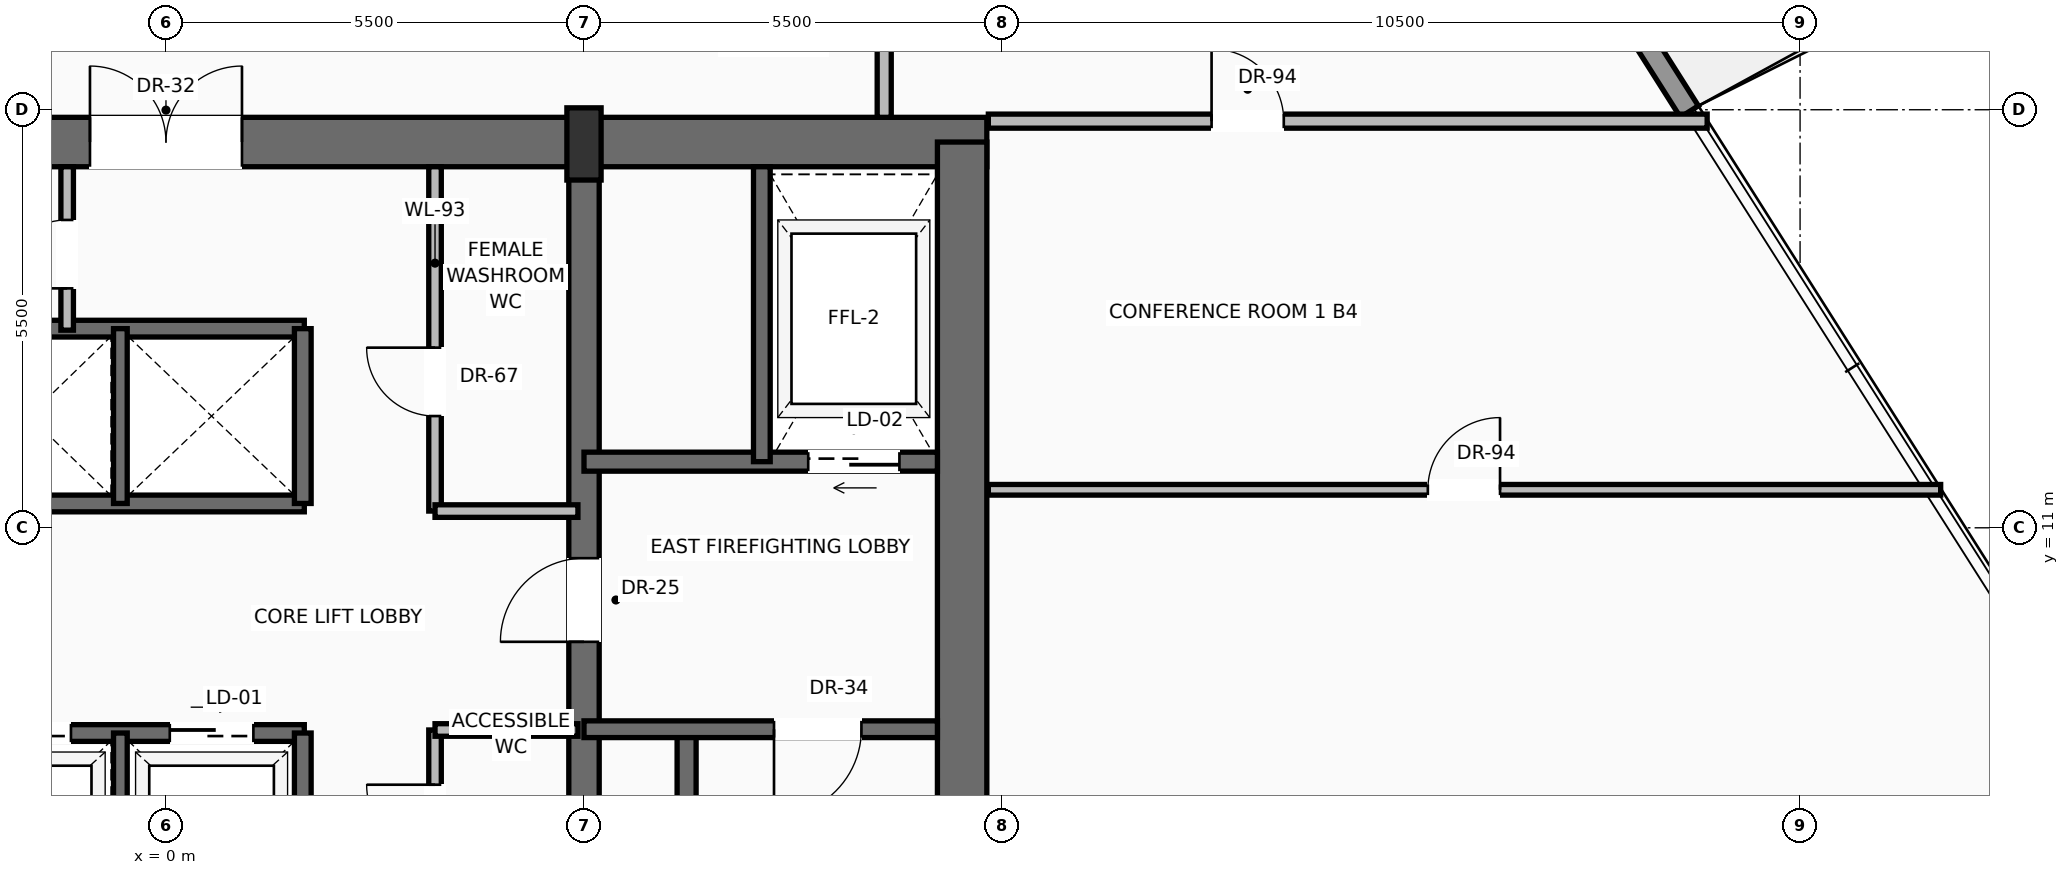
"""IFC4 building model, lengths in metres.
Left out: names, types, materials, properties, quantities, classifications, styles, units other than length and angle.
Written with IfcOpenShell. Run it as: python <this file> out.ifc"""

import sys

from ifc_helpers import new_model, si_unit, direction, frame, frame_2d, origin, origin_2d, place, context, subcontext, project, spatial, rectangle, extrude, source, transform, mapped, element, fill, save


model = new_model("IFC4")
c1 = context("Model", 3, precision=1e-05, world=origin(), true_north=direction((0.0, 1.0)))
c2 = subcontext(c1, "Body", "Model", "MODEL_VIEW")
j1 = project(units=[si_unit("LENGTHUNIT", "METRE"), si_unit("PLANEANGLEUNIT", "RADIAN")], contexts=[c1])
p1 = place(None, origin())
s1 = spatial("IfcSite", under=j1, at=p1, CompositionType="ELEMENT")
p2 = place(p1, origin())
s2 = spatial("IfcBuilding", under=s1, at=p2, CompositionType="ELEMENT")
p3 = place(p2, frame((0.0, 0.0, 185.8)))
s3 = spatial("IfcBuildingStorey", under=s2, at=p3, CompositionType="ELEMENT", Elevation=185.8)
p4 = place(p3, frame((-10.8, 16.075, 0.0), z_axis=(0.0, 0.0, 1.0), x_axis=(1.0, 0.0, 0.0)))
e1 = element("IfcWall", 1, at=p4, inside=s3, PredefinedType="SHEAR", context=c2, shape_type="SweptSolid", body=[
    extrude(rectangle(XDim=21.6, YDim=0.65, at=frame_2d((10.8, 0.0))), origin(), (0.0, 0.0, 1.0), 3.47),
])
p5 = place(p4, frame((3.37, 0.0, 0.0)))
e2 = element("IfcOpeningElement", 2, at=p5, cuts=e1, PredefinedType="OPENING", context=c2, shape_type="SweptSolid", body=[
    extrude(rectangle(XDim=1.3, YDim=2.3, at=frame_2d((0.65, 1.15))), frame((0.0, 0.335, 0.0), z_axis=(0.0, -1.0, 0.0), x_axis=(1.0, 0.0, 0.0)), (0.0, 0.0, 1.0), 0.67),
])
p6 = place(p4, frame((9.8, 0.0, 0.0)))
e3 = element("IfcOpeningElement", 3, at=p6, cuts=e1, PredefinedType="OPENING", context=c2, shape_type="SweptSolid", body=[
    extrude(rectangle(XDim=2.0, YDim=2.4, at=frame_2d((1.0, 1.2))), frame((0.0, 0.335, 0.0), z_axis=(0.0, -1.0, 0.0), x_axis=(1.0, 0.0, 0.0)), (0.0, 0.0, 1.0), 0.67),
])
p7 = place(p3, frame((10.475, 0.525, 0.0), z_axis=(0.0, 0.0, 1.0), x_axis=(0.0, 1.0, 0.0)))
e4 = element("IfcWall", 4, at=p7, inside=s3, PredefinedType="SHEAR", context=c2, shape_type="SweptSolid", body=[
    extrude(rectangle(XDim=15.55, YDim=0.65, at=frame_2d((7.775, 0.0))), origin(), (0.0, 0.0, 1.0), 3.47),
])
p8 = place(p3, frame((5.5, 0.525, 0.0), z_axis=(0.0, 0.0, 1.0), x_axis=(0.0, 1.0, 0.0)))
e5 = element("IfcWall", 5, at=p8, inside=s3, PredefinedType="SHEAR", context=c2, shape_type="SweptSolid", body=[
    extrude(rectangle(XDim=15.55, YDim=0.4, at=frame_2d((7.775, 0.0))), origin(), (0.0, 0.0, 1.0), 3.47),
])
p9 = place(p8, frame((8.975, 0.0, 0.0)))
e6 = element("IfcOpeningElement", 6, at=p9, cuts=e5, PredefinedType="OPENING", context=c2, shape_type="SweptSolid", body=[
    extrude(rectangle(XDim=1.1, YDim=2.2, at=frame_2d((0.55, 1.1))), frame((0.0, 0.21, 0.0), z_axis=(0.0, -1.0, 0.0), x_axis=(1.0, 0.0, 0.0)), (0.0, 0.0, 1.0), 0.42),
])
m1 = source(origin(), c2, "Body", "SweptSolid", [
    extrude(rectangle(XDim=0.45, YDim=0.95, at=origin_2d()), origin(), (0.0, 0.0, 1.0), 3.7),
])
p10 = place(p3, frame((5.5, 16.05, 0.0), z_axis=(0.0, 0.0, 1.0), x_axis=(1.0, 0.0, 0.0)))
e7 = element("IfcColumn", 7, at=p10, inside=s3, PredefinedType="PILASTER", context=c2, shape_type="MappedRepresentation", body=[
    mapped(m1, transform((0.0, 0.0, 0.0), scale=1.0)),
])
p11 = place(p3, frame((9.943, 32.422, 0.0), z_axis=(0.0, 0.0, 1.0), x_axis=(0.535123469973, -0.844773858428, 0.0)))
e8 = element("IfcWall", 8, at=p11, inside=s3, PredefinedType="SOLIDWALL", context=c2, shape_type="SweptSolid", body=[
    extrude(rectangle(XDim=18.875, YDim=0.28, at=frame_2d((9.438, 0.0))), origin(), (0.0, 0.0, 1.0), 3.05),
])
p12 = place(p11, frame((4.53, 0.0, 0.0)))
e9 = element("IfcOpeningElement", 9, at=p12, cuts=e8, PredefinedType="OPENING", context=c2, shape_type="SweptSolid", body=[
    extrude(rectangle(XDim=1.6, YDim=2.35, at=frame_2d((0.8, 1.175))), frame((0.0, 0.15, 0.0), z_axis=(0.0, -1.0, 0.0), x_axis=(1.0, 0.0, 0.0)), (0.0, 0.0, 1.0), 0.3),
])
p13 = place(p11, frame((12.835, 0.0, 0.9)))
e10 = element("IfcOpeningElement", 10, at=p13, cuts=e8, PredefinedType="OPENING", context=c2, shape_type="SweptSolid", body=[
    extrude(rectangle(XDim=1.55, YDim=1.85, at=frame_2d((0.775, 0.925))), frame((0.0, 0.15, 0.0), z_axis=(0.0, -1.0, 0.0), x_axis=(1.0, 0.0, 0.0)), (0.0, 0.0, 1.0), 0.3),
])
p14 = place(p3, frame((6.85, 0.85, 0.0), z_axis=(0.0, 0.0, 1.0), x_axis=(0.0, 1.0, 0.0)))
e11 = element("IfcWall", 11, at=p14, inside=s3, PredefinedType="SOLIDWALL", context=c2, shape_type="SweptSolid", body=[
    extrude(rectangle(XDim=7.5, YDim=0.25, at=frame_2d((3.75, 0.0))), origin(), (0.0, 0.0, 1.0), 3.47),
])
p15 = place(p3, frame((10.15, 8.35, 0.0), z_axis=(0.0, 0.0, 1.0), x_axis=(-1.0, 0.0, 0.0)))
e12 = element("IfcWall", 12, at=p15, inside=s3, PredefinedType="SOLIDWALL", context=c2, shape_type="SweptSolid", body=[
    extrude(rectangle(XDim=4.65, YDim=0.22, at=frame_2d((2.325, 0.0))), origin(), (0.0, 0.0, 1.0), 3.47),
])
p16 = place(p15, frame((1.0, 0.0, 0.0)))
e13 = element("IfcOpeningElement", 13, at=p16, cuts=e12, PredefinedType="OPENING", context=c2, shape_type="SweptSolid", body=[
    extrude(rectangle(XDim=1.15, YDim=2.2, at=frame_2d((0.575, 1.1))), frame((0.0, 0.12, 0.0), z_axis=(0.0, -1.0, 0.0), x_axis=(1.0, 0.0, 0.0)), (0.0, 0.0, 1.0), 0.24),
])
p17 = place(p3, frame((10.15, 11.87, 0.0), z_axis=(0.0, 0.0, 1.0), x_axis=(-1.0, 0.0, 0.0)))
e14 = element("IfcWall", 14, at=p17, inside=s3, PredefinedType="SOLIDWALL", context=c2, shape_type="SweptSolid", body=[
    extrude(rectangle(XDim=4.65, YDim=0.25, at=frame_2d((2.325, 0.0))), origin(), (0.0, 0.0, 1.0), 3.47),
])
p18 = place(p17, frame((0.5, 0.0, 0.0)))
e15 = element("IfcOpeningElement", 15, at=p18, cuts=e14, PredefinedType="OPENING", context=c2, shape_type="SweptSolid", body=[
    extrude(rectangle(XDim=1.2, YDim=2.25, at=frame_2d((0.6, 1.125))), frame((0.0, 0.135, 0.0), z_axis=(0.0, -1.0, 0.0), x_axis=(1.0, 0.0, 0.0)), (0.0, 0.0, 1.0), 0.27),
])
p19 = place(p3, frame((7.84, 11.87, 0.0), z_axis=(0.0, 0.0, 1.0), x_axis=(0.0, 1.0, 0.0)))
e16 = element("IfcWall", 16, at=p19, inside=s3, PredefinedType="SOLIDWALL", context=c2, shape_type="SweptSolid", body=[
    extrude(rectangle(XDim=3.88, YDim=0.22, at=frame_2d((1.94, 0.0))), origin(), (0.0, 0.0, 1.0), 3.47),
])
p20 = place(p3, frame((3.54, 6.0, 0.0), z_axis=(0.0, 0.0, 1.0), x_axis=(0.0, 1.0, 0.0)))
e17 = element("IfcWall", 17, at=p20, inside=s3, PredefinedType="PARTITIONING", context=c2, shape_type="SweptSolid", body=[
    extrude(rectangle(XDim=2.34, YDim=0.165, at=frame_2d((1.17, 0.0))), origin(), (0.0, 0.0, 1.0), 3.462),
])
p21 = place(p20, frame((0.72, 0.0, 0.0)))
e18 = element("IfcOpeningElement", 18, at=p21, cuts=e17, PredefinedType="OPENING", context=c2, shape_type="SweptSolid", body=[
    extrude(rectangle(XDim=0.9, YDim=2.1, at=frame_2d((0.45, 1.05))), frame((0.0, 0.093, 0.0), z_axis=(0.0, -1.0, 0.0), x_axis=(1.0, 0.0, 0.0)), (0.0, 0.0, 1.0), 0.185),
])
p22 = place(p3, frame((3.54, 8.34, 0.0), z_axis=(0.0, 0.0, 1.0), x_axis=(1.0, 0.0, 0.0)))
e19 = element("IfcWall", 19, at=p22, inside=s3, PredefinedType="PARTITIONING", context=c2, shape_type="SweptSolid", body=[
    extrude(rectangle(XDim=1.88, YDim=0.165, at=frame_2d((0.94, 0.0))), origin(), (0.0, 0.0, 1.0), 3.462),
])
p23 = place(p3, frame((-5.5, 8.3, 0.0), z_axis=(0.0, 0.0, 1.0), x_axis=(1.0, 0.0, 0.0)))
e20 = element("IfcWall", 20, at=p23, inside=s3, PredefinedType="SOLIDWALL", context=c2, shape_type="SweptSolid", body=[
    extrude(rectangle(XDim=7.32, YDim=0.22, at=frame_2d((3.66, 0.0))), origin(), (0.0, 0.0, 1.0), 3.47),
])
p24 = place(p23, frame((0.75, 0.0, 0.0)))
e21 = element("IfcOpeningElement", 21, at=p24, cuts=e20, PredefinedType="OPENING", context=c2, shape_type="SweptSolid", body=[
    extrude(rectangle(XDim=1.1, YDim=2.2, at=frame_2d((0.55, 1.1))), frame((0.0, 0.12, 0.0), z_axis=(0.0, -1.0, 0.0), x_axis=(1.0, 0.0, 0.0)), (0.0, 0.0, 1.0), 0.24),
])
p25 = place(p23, frame((3.15, 0.0, 0.0)))
e22 = element("IfcOpeningElement", 22, at=p25, cuts=e20, PredefinedType="OPENING", context=c2, shape_type="SweptSolid", body=[
    extrude(rectangle(XDim=1.1, YDim=2.2, at=frame_2d((0.55, 1.1))), frame((0.0, 0.12, 0.0), z_axis=(0.0, -1.0, 0.0), x_axis=(1.0, 0.0, 0.0)), (0.0, 0.0, 1.0), 0.24),
])
p26 = place(p23, frame((5.55, 0.0, 0.0)))
e23 = element("IfcOpeningElement", 23, at=p26, cuts=e20, PredefinedType="OPENING", context=c2, shape_type="SweptSolid", body=[
    extrude(rectangle(XDim=1.1, YDim=2.2, at=frame_2d((0.55, 1.1))), frame((0.0, 0.12, 0.0), z_axis=(0.0, -1.0, 0.0), x_axis=(1.0, 0.0, 0.0)), (0.0, 0.0, 1.0), 0.24),
])
p27 = place(p3, frame((1.8, 6.0, 0.0), z_axis=(0.0, 0.0, 1.0), x_axis=(0.0, 1.0, 0.0)))
e24 = element("IfcWall", 24, at=p27, inside=s3, PredefinedType="SOLIDWALL", context=c2, shape_type="SweptSolid", body=[
    extrude(rectangle(XDim=2.3, YDim=0.22, at=frame_2d((1.15, 0.0))), origin(), (0.0, 0.0, 1.0), 3.47),
])
p28 = place(p3, frame((-0.6, 6.0, 0.0), z_axis=(0.0, 0.0, 1.0), x_axis=(0.0, 1.0, 0.0)))
e25 = element("IfcWall", 25, at=p28, inside=s3, PredefinedType="SOLIDWALL", context=c2, shape_type="SweptSolid", body=[
    extrude(rectangle(XDim=2.3, YDim=0.18, at=frame_2d((1.15, 0.0))), origin(), (0.0, 0.0, 1.0), 3.47),
])
for number, where, z_axis, x_axis in (
    (26, (-5.5, 11.32, 0.0), (0.0, 0.0, 1.0), (1.0, 0.0, 0.0)),
    (27, (-5.5, 13.62, 0.0), (0.0, 0.0, 1.0), (1.0, 0.0, 0.0)),
):
    element("IfcWall", number, at=place(p3, frame(where, z_axis=z_axis, x_axis=x_axis)), inside=s3, PredefinedType="SOLIDWALL", context=c2, shape_type="SweptSolid", body=[
        extrude(rectangle(XDim=7.32, YDim=0.22, at=frame_2d((3.66, 0.0))), origin(), (0.0, 0.0, 1.0), 3.47),
    ])
p29 = place(p3, frame((1.8, 11.32, 0.0), z_axis=(0.0, 0.0, 1.0), x_axis=(0.0, 1.0, 0.0)))
e28 = element("IfcWall", 28, at=p29, inside=s3, PredefinedType="SOLIDWALL", context=c2, shape_type="SweptSolid", body=[
    extrude(rectangle(XDim=2.3, YDim=0.22, at=frame_2d((1.15, 0.0))), origin(), (0.0, 0.0, 1.0), 3.47),
])
p30 = place(p3, frame((-0.6, 11.32, 0.0), z_axis=(0.0, 0.0, 1.0), x_axis=(0.0, 1.0, 0.0)))
e29 = element("IfcWall", 29, at=p30, inside=s3, PredefinedType="SOLIDWALL", context=c2, shape_type="SweptSolid", body=[
    extrude(rectangle(XDim=2.3, YDim=0.18, at=frame_2d((1.15, 0.0))), origin(), (0.0, 0.0, 1.0), 3.47),
])
p31 = place(p3, frame((-1.3, 13.6, 0.0), z_axis=(0.0, 0.0, 1.0), x_axis=(0.0, 1.0, 0.0)))
e30 = element("IfcWall", 30, at=p31, inside=s3, PredefinedType="PARTITIONING", context=c2, shape_type="SweptSolid", body=[
    extrude(rectangle(XDim=2.15, YDim=0.165, at=frame_2d((1.075, 0.0))), origin(), (0.0, 0.0, 1.0), 3.462),
])
p32 = place(p31, frame((0.55, 0.0, 0.0)))
e31 = element("IfcOpeningElement", 31, at=p32, cuts=e30, PredefinedType="OPENING", context=c2, shape_type="SweptSolid", body=[
    extrude(rectangle(XDim=0.9, YDim=2.1, at=frame_2d((0.45, 1.05))), frame((0.0, 0.093, 0.0), z_axis=(0.0, -1.0, 0.0), x_axis=(1.0, 0.0, 0.0)), (0.0, 0.0, 1.0), 0.185),
])
p33 = place(p3, frame((3.54, 11.22, 0.0), z_axis=(0.0, 0.0, 1.0), x_axis=(0.0, 1.0, 0.0)))
e32 = element("IfcWall", 32, at=p33, inside=s3, PredefinedType="PARTITIONING", context=c2, shape_type="SweptSolid", body=[
    extrude(rectangle(XDim=4.53, YDim=0.165, at=frame_2d((2.265, 0.0))), origin(), (0.0, 0.0, 1.0), 3.462),
])
p34 = place(p33, frame((1.25, 0.0, 0.0)))
e33 = element("IfcOpeningElement", 33, at=p34, cuts=e32, PredefinedType="OPENING", context=c2, shape_type="SweptSolid", body=[
    extrude(rectangle(XDim=0.9, YDim=2.1, at=frame_2d((0.45, 1.05))), frame((0.0, 0.093, 0.0), z_axis=(0.0, -1.0, 0.0), x_axis=(1.0, 0.0, 0.0)), (0.0, 0.0, 1.0), 0.185),
])
p35 = place(p3, frame((3.54, 11.22, 0.0), z_axis=(0.0, 0.0, 1.0), x_axis=(1.0, 0.0, 0.0)))
e34 = element("IfcWall", 34, at=p35, inside=s3, PredefinedType="PARTITIONING", context=c2, shape_type="SweptSolid", body=[
    extrude(rectangle(XDim=1.88, YDim=0.165, at=frame_2d((0.94, 0.0))), origin(), (0.0, 0.0, 1.0), 3.462),
])
p36 = place(p3, frame((9.45, 16.4, 0.0), z_axis=(0.0, 0.0, 1.0), x_axis=(0.0, 1.0, 0.0)))
e35 = element("IfcWall", 35, at=p36, inside=s3, PredefinedType="PARTITIONING", context=c2, shape_type="SweptSolid", body=[
    extrude(rectangle(XDim=7.0, YDim=0.185, at=frame_2d((3.5, 0.0))), origin(), (0.0, 0.0, 1.0), 3.462),
])
p37 = place(p36, frame((3.341, 0.0, 0.0)))
e36 = element("IfcOpeningElement", 36, at=p37, cuts=e35, PredefinedType="OPENING", context=c2, shape_type="SweptSolid", body=[
    extrude(rectangle(XDim=0.95, YDim=2.2, at=frame_2d((0.475, 1.1))), frame((0.0, 0.103, 0.0), z_axis=(0.0, -1.0, 0.0), x_axis=(1.0, 0.0, 0.0)), (0.0, 0.0, 1.0), 0.205),
])
p38 = place(p3, frame((10.82, 16.35, 0.0), z_axis=(0.0, 0.0, 1.0), x_axis=(1.0, 0.0, 0.0)))
e37 = element("IfcWall", 37, at=p38, inside=s3, PredefinedType="PARTITIONING", context=c2, shape_type="SweptSolid", body=[
    extrude(rectangle(XDim=9.458, YDim=0.185, at=frame_2d((4.729, 0.0))), origin(), (0.0, 0.0, 1.0), 3.462),
])
p39 = place(p38, frame((2.937, 0.0, 0.0)))
e38 = element("IfcOpeningElement", 38, at=p39, cuts=e37, PredefinedType="OPENING", context=c2, shape_type="SweptSolid", body=[
    extrude(rectangle(XDim=0.95, YDim=2.2, at=frame_2d((0.475, 1.1))), frame((0.0, 0.103, 0.0), z_axis=(0.0, -1.0, 0.0), x_axis=(1.0, 0.0, 0.0)), (0.0, 0.0, 1.0), 0.205),
])
p40 = place(p3, frame((10.82, 11.5, 0.0), z_axis=(0.0, 0.0, 1.0), x_axis=(1.0, 0.0, 0.0)))
e39 = element("IfcWall", 39, at=p40, inside=s3, PredefinedType="PARTITIONING", context=c2, shape_type="SweptSolid", body=[
    extrude(rectangle(XDim=12.53, YDim=0.14, at=frame_2d((6.265, 0.0))), origin(), (0.0, 0.0, 1.0), 3.462),
])
p41 = place(p40, frame((5.782, 0.0, 0.0)))
e40 = element("IfcOpeningElement", 40, at=p41, cuts=e39, PredefinedType="OPENING", context=c2, shape_type="SweptSolid", body=[
    extrude(rectangle(XDim=0.95, YDim=2.2, at=frame_2d((0.475, 1.1))), frame((0.0, 0.08, 0.0), z_axis=(0.0, -1.0, 0.0), x_axis=(1.0, 0.0, 0.0)), (0.0, 0.0, 1.0), 0.16),
])
m2 = source(origin(), c2, "Body", "SweptSolid", [
    extrude(rectangle(XDim=1.15, YDim=2.2, at=frame_2d((0.575, 1.1))), frame((0.0, 0.025, 0.0), z_axis=(0.0, -1.0, 0.0), x_axis=(1.0, 0.0, 0.0)), (0.0, 0.0, 1.0), 0.05),
])
p42 = place(p16, origin())
e41 = element("IfcDoor", 41, at=p42, inside=s3, OperationType="SINGLE_SWING_RIGHT", PredefinedType="DOOR", context=c2, shape_type="MappedRepresentation", body=[
    mapped(m2, transform((0.0, 0.0, 0.0), scale=1.0)),
])
fill(e13, e41)
m3 = source(origin(), c2, "Body", "SweptSolid", [
    extrude(rectangle(XDim=1.1, YDim=2.2, at=frame_2d((0.55, 1.1))), frame((0.0, 0.025, 0.0), z_axis=(0.0, -1.0, 0.0), x_axis=(1.0, 0.0, 0.0)), (0.0, 0.0, 1.0), 0.05),
])
p43 = place(p9, origin())
e42 = element("IfcDoor", 42, at=p43, inside=s3, OperationType="SINGLE_SWING_LEFT", PredefinedType="DOOR", context=c2, shape_type="MappedRepresentation", body=[
    mapped(m3, transform((0.0, 0.0, 0.0), scale=1.0)),
])
fill(e6, e42)
m4 = source(origin(), c2, "Body", "SweptSolid", [
    extrude(rectangle(XDim=1.2, YDim=2.25, at=frame_2d((0.6, 1.125))), frame((0.0, 0.025, 0.0), z_axis=(0.0, -1.0, 0.0), x_axis=(1.0, 0.0, 0.0)), (0.0, 0.0, 1.0), 0.05),
])
p44 = place(p18, origin())
e43 = element("IfcDoor", 43, at=p44, inside=s3, OperationType="SLIDING_TO_RIGHT", PredefinedType="DOOR", context=c2, shape_type="MappedRepresentation", body=[
    mapped(m4, transform((0.0, 0.0, 0.0), scale=1.0)),
])
fill(e15, e43)
m5 = source(origin(), c2, "Body", "SweptSolid", [
    extrude(rectangle(XDim=2.0, YDim=2.4, at=frame_2d((1.0, 1.2))), frame((0.0, 0.025, 0.0), z_axis=(0.0, -1.0, 0.0), x_axis=(1.0, 0.0, 0.0)), (0.0, 0.0, 1.0), 0.05),
])
p45 = place(p6, origin())
e44 = element("IfcDoor", 44, at=p45, inside=s3, OperationType="DOUBLE_DOOR_SINGLE_SWING", PredefinedType="DOOR", context=c2, shape_type="MappedRepresentation", body=[
    mapped(m5, transform((0.0, 0.0, 0.0), scale=1.0)),
])
fill(e3, e44)
m6 = source(origin(), c2, "Body", "SweptSolid", [
    extrude(rectangle(XDim=0.9, YDim=2.1, at=frame_2d((0.45, 1.05))), frame((0.0, 0.025, 0.0), z_axis=(0.0, -1.0, 0.0), x_axis=(1.0, 0.0, 0.0)), (0.0, 0.0, 1.0), 0.05),
])
p46 = place(p21, origin())
e45 = element("IfcDoor", 45, at=p46, inside=s3, OperationType="SINGLE_SWING_RIGHT", PredefinedType="DOOR", context=c2, shape_type="MappedRepresentation", body=[
    mapped(m6, transform((0.0, 0.0, 0.0), scale=1.0)),
])
fill(e18, e45)
m7 = source(origin(), c2, "Body", "SweptSolid", [
    extrude(rectangle(XDim=1.1, YDim=2.2, at=frame_2d((0.55, 1.1))), frame((0.0, 0.025, 0.0), z_axis=(0.0, -1.0, 0.0), x_axis=(1.0, 0.0, 0.0)), (0.0, 0.0, 1.0), 0.05),
])
p47 = place(p25, origin())
e46 = element("IfcDoor", 46, at=p47, inside=s3, OperationType="SLIDING_TO_LEFT", PredefinedType="DOOR", context=c2, shape_type="MappedRepresentation", body=[
    mapped(m7, transform((0.0, 0.0, 0.0), scale=1.0)),
])
fill(e22, e46)
p48 = place(p26, origin())
e47 = element("IfcDoor", 47, at=p48, inside=s3, OperationType="SLIDING_TO_LEFT", PredefinedType="DOOR", context=c2, shape_type="MappedRepresentation", body=[
    mapped(m7, transform((0.0, 0.0, 0.0), scale=1.0)),
])
fill(e23, e47)
p49 = place(p32, origin())
e48 = element("IfcDoor", 48, at=p49, inside=s3, OperationType="SINGLE_SWING_LEFT", PredefinedType="DOOR", context=c2, shape_type="MappedRepresentation", body=[
    mapped(m6, transform((0.0, 0.0, 0.0), scale=1.0)),
])
fill(e31, e48)
p50 = place(p34, origin())
e49 = element("IfcDoor", 49, at=p50, inside=s3, OperationType="SINGLE_SWING_RIGHT", PredefinedType="DOOR", context=c2, shape_type="MappedRepresentation", body=[
    mapped(m6, transform((0.0, 0.0, 0.0), scale=1.0)),
])
fill(e33, e49)
m8 = source(origin(), c2, "Body", "SweptSolid", [
    extrude(rectangle(XDim=0.95, YDim=2.2, at=frame_2d((0.475, 1.1))), frame((0.0, 0.025, 0.0), z_axis=(0.0, -1.0, 0.0), x_axis=(1.0, 0.0, 0.0)), (0.0, 0.0, 1.0), 0.05),
])
p51 = place(p39, origin())
e50 = element("IfcDoor", 50, at=p51, inside=s3, OperationType="SINGLE_SWING_LEFT", PredefinedType="DOOR", context=c2, shape_type="MappedRepresentation", body=[
    mapped(m8, transform((0.0, 0.0, 0.0), scale=1.0)),
])
fill(e38, e50)
p52 = place(p41, origin())
e51 = element("IfcDoor", 51, at=p52, inside=s3, OperationType="SINGLE_SWING_RIGHT", PredefinedType="DOOR", context=c2, shape_type="MappedRepresentation", body=[
    mapped(m8, transform((0.0, 0.0, 0.0), scale=1.0)),
])
fill(e40, e51)
save(model, sys.argv[1])
